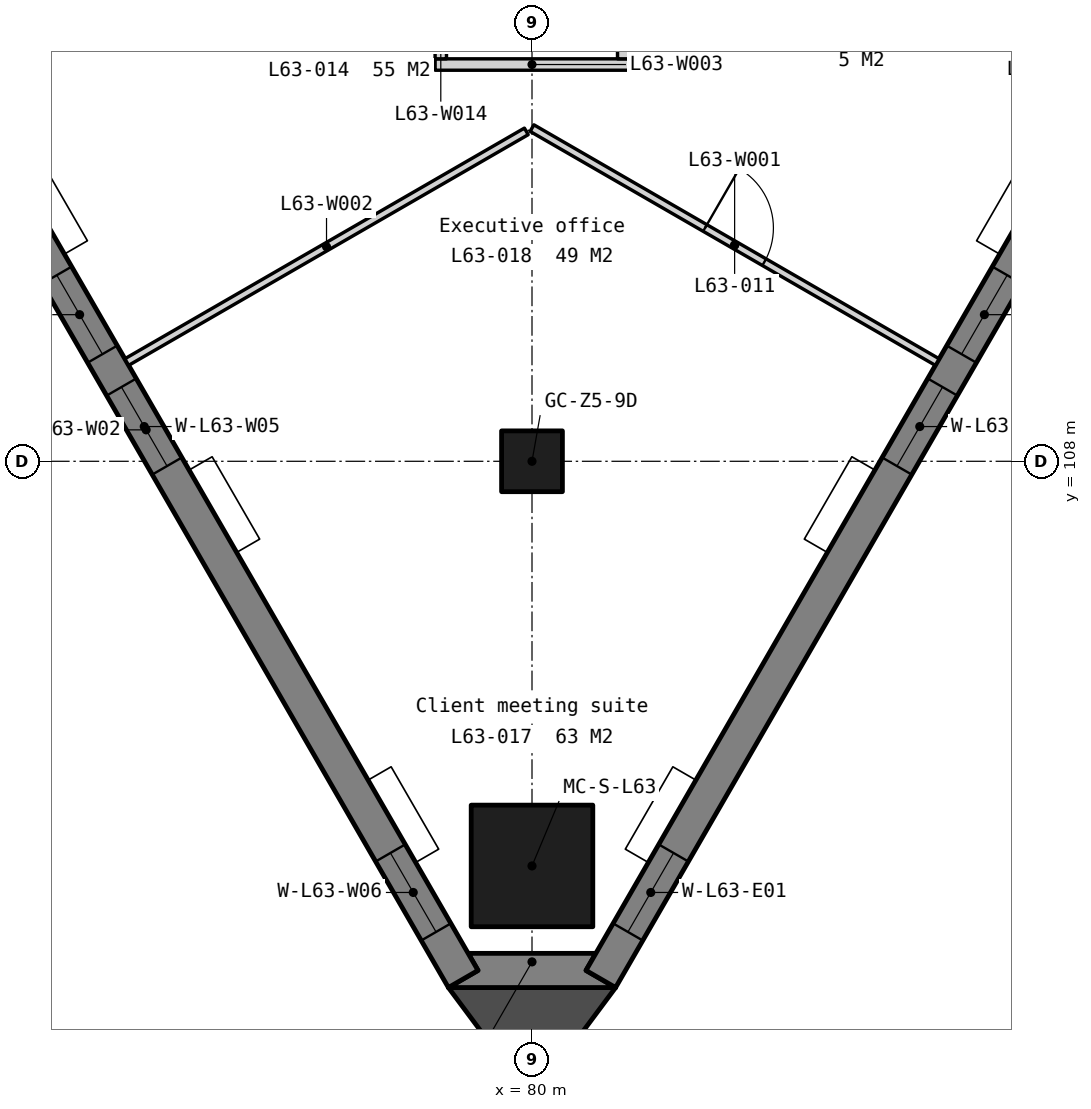
"""IFC4 building model, lengths in metres.
Left out: names, types, materials, properties, quantities, classifications, styles, units other than length and angle.
Written with IfcOpenShell. Run it as: python <this file> out.ifc"""

import sys

from ifc_helpers import new_model, si_unit, direction, frame, frame_2d, origin, origin_2d, place, context, subcontext, project, spatial, polyline, rectangle, outline, extrude, element, fill, save


model = new_model("IFC4")
c1 = context("Model", 3, precision=1e-05, world=origin(), true_north=direction((0.0, 1.0)))
c2 = subcontext(c1, "Body", "Model", "MODEL_VIEW")
j1 = project(units=[si_unit("LENGTHUNIT", "METRE"), si_unit("PLANEANGLEUNIT", "RADIAN")], contexts=[c1])
p1 = place(None, origin())
s1 = spatial("IfcSite", under=j1, at=p1, CompositionType="ELEMENT")
p2 = place(p1, origin())
s2 = spatial("IfcBuilding", under=s1, at=p2, CompositionType="ELEMENT")
p3 = place(p2, frame((0.0, 0.0, 258.2)))
s3 = spatial("IfcBuildingStorey", under=s2, at=p3, CompositionType="ELEMENT", Elevation=258.2)
p4 = place(p3, frame((80.0, 108.0, 0.0), z_axis=(0.0, 0.0, 1.0), x_axis=(1.0, 0.0, 0.0)))
e1 = element("IfcColumn", 1, at=p4, inside=s3, PredefinedType="COLUMN", context=c2, shape_type="SweptSolid", body=[
    extrude(rectangle(XDim=0.8, YDim=0.8, at=origin_2d()), origin(), (0.0, 0.0, 1.0), 3.9),
])
p5 = place(p3, frame((80.0, 102.676, 0.0), z_axis=(0.0, 0.0, 1.0), x_axis=(1.0, 0.0, 0.0)))
e2 = element("IfcColumn", 2, at=p5, inside=s3, PredefinedType="COLUMN", context=c2, shape_type="SweptSolid", body=[
    extrude(rectangle(XDim=1.6, YDim=1.6, at=origin_2d()), origin(), (0.0, 0.0, 1.0), 3.9),
])
p6 = place(p3, frame((0.0, 0.0, -0.15)))
e3 = element("IfcWall", 3, at=p6, inside=s3, PredefinedType="SOLIDWALL", context=c2, shape_type="SweptSolid", body=[
    extrude(outline(polyline([(78.9, 101.076), (79.29, 101.301), (79.16, 101.526), (80.84, 101.526), (80.71, 101.301), (81.1, 101.076), (78.9, 101.076)])), origin(), (0.0, 0.0, 1.0), 3.9),
])
p7 = place(p3, frame((70.752, 115.639, -0.15), z_axis=(0.0, 0.0, 1.0), x_axis=(0.500006996263, -0.866021364453, 0.0)))
e4 = element("IfcWall", 4, at=p7, inside=s3, PredefinedType="SOLIDWALL", context=c2, shape_type="SweptSolid", body=[
    extrude(outline(polyline([(16.686, 3.9), (16.686, 0.0), (0.0, 0.0), (0.0, 3.9), (16.686, 3.9)])), frame((0.0, 0.225, 0.0), z_axis=(0.0, -1.0, 0.0), x_axis=(1.0, 0.0, 0.0)), (0.0, 0.0, 1.0), 0.45),
])
p8 = place(p7, frame((5.993, 0.0, 0.95)))
e5 = element("IfcOpeningElement", 5, at=p8, cuts=e4, PredefinedType="OPENING", context=c2, shape_type="SweptSolid", body=[
    extrude(rectangle(XDim=1.2, YDim=2.2, at=frame_2d((0.6, 1.1))), frame((0.0, 0.235, 0.0), z_axis=(0.0, -1.0, 0.0), x_axis=(1.0, 0.0, 0.0)), (0.0, 0.0, 1.0), 0.47),
])
p9 = place(p7, frame((7.693, 0.0, 0.95)))
e6 = element("IfcOpeningElement", 6, at=p9, cuts=e4, PredefinedType="OPENING", context=c2, shape_type="SweptSolid", body=[
    extrude(rectangle(XDim=1.2, YDim=2.2, at=frame_2d((0.6, 1.1))), frame((0.0, 0.235, 0.0), z_axis=(0.0, -1.0, 0.0), x_axis=(1.0, 0.0, 0.0)), (0.0, 0.0, 1.0), 0.47),
])
p10 = place(p7, frame((14.771, 0.0, 0.95)))
e7 = element("IfcOpeningElement", 7, at=p10, cuts=e4, PredefinedType="OPENING", context=c2, shape_type="SweptSolid", body=[
    extrude(rectangle(XDim=1.2, YDim=2.2, at=frame_2d((0.6, 1.1))), frame((0.0, 0.235, 0.0), z_axis=(0.0, -1.0, 0.0), x_axis=(1.0, 0.0, 0.0)), (0.0, 0.0, 1.0), 0.47),
])
p11 = place(p3, frame((80.905, 101.188, -0.15), z_axis=(0.0, 0.0, 1.0), x_axis=(0.500002536638, 0.866023939251, 0.0)))
e8 = element("IfcWall", 8, at=p11, inside=s3, PredefinedType="SOLIDWALL", context=c2, shape_type="SweptSolid", body=[
    extrude(outline(polyline([(36.972, 0.0), (36.972, 3.9), (0.0, 3.9), (0.0, 0.0), (36.972, 0.0)])), frame((0.0, 0.225, 0.0), z_axis=(0.0, -1.0, 0.0), x_axis=(1.0, 0.0, 0.0)), (0.0, 0.0, 1.0), 0.45),
])
p12 = place(p11, frame((0.715, 0.0, 0.95)))
e9 = element("IfcOpeningElement", 9, at=p12, cuts=e8, PredefinedType="OPENING", context=c2, shape_type="SweptSolid", body=[
    extrude(rectangle(XDim=1.2, YDim=2.2, at=frame_2d((0.6, 1.1))), frame((0.0, 0.235, 0.0), z_axis=(0.0, -1.0, 0.0), x_axis=(1.0, 0.0, 0.0)), (0.0, 0.0, 1.0), 0.47),
])
p13 = place(p11, frame((7.793, 0.0, 0.95)))
e10 = element("IfcOpeningElement", 10, at=p13, cuts=e8, PredefinedType="OPENING", context=c2, shape_type="SweptSolid", body=[
    extrude(rectangle(XDim=1.2, YDim=2.2, at=frame_2d((0.6, 1.1))), frame((0.0, 0.235, 0.0), z_axis=(0.0, -1.0, 0.0), x_axis=(1.0, 0.0, 0.0)), (0.0, 0.0, 1.0), 0.47),
])
p14 = place(p11, frame((9.493, 0.0, 0.95)))
e11 = element("IfcOpeningElement", 11, at=p14, cuts=e8, PredefinedType="OPENING", context=c2, shape_type="SweptSolid", body=[
    extrude(rectangle(XDim=1.2, YDim=2.2, at=frame_2d((0.6, 1.1))), frame((0.0, 0.235, 0.0), z_axis=(0.0, -1.0, 0.0), x_axis=(1.0, 0.0, 0.0)), (0.0, 0.0, 1.0), 0.47),
])
p15 = place(p11, frame((17.036, 0.0, 0.95)))
e12 = element("IfcOpeningElement", 12, at=p15, cuts=e8, PredefinedType="OPENING", context=c2, shape_type="SweptSolid", body=[
    extrude(rectangle(XDim=1.2, YDim=2.2, at=frame_2d((0.6, 1.1))), frame((0.0, 0.235, 0.0), z_axis=(0.0, -1.0, 0.0), x_axis=(1.0, 0.0, 0.0)), (0.0, 0.0, 1.0), 0.47),
])
p16 = place(p11, frame((18.736, 0.0, 0.95)))
e13 = element("IfcOpeningElement", 13, at=p16, cuts=e8, PredefinedType="OPENING", context=c2, shape_type="SweptSolid", body=[
    extrude(rectangle(XDim=1.2, YDim=2.2, at=frame_2d((0.6, 1.1))), frame((0.0, 0.235, 0.0), z_axis=(0.0, -1.0, 0.0), x_axis=(1.0, 0.0, 0.0)), (0.0, 0.0, 1.0), 0.47),
])
p17 = place(p11, frame((26.279, 0.0, 0.95)))
e14 = element("IfcOpeningElement", 14, at=p17, cuts=e8, PredefinedType="OPENING", context=c2, shape_type="SweptSolid", body=[
    extrude(rectangle(XDim=1.2, YDim=2.2, at=frame_2d((0.6, 1.1))), frame((0.0, 0.235, 0.0), z_axis=(0.0, -1.0, 0.0), x_axis=(1.0, 0.0, 0.0)), (0.0, 0.0, 1.0), 0.47),
])
p18 = place(p11, frame((27.979, 0.0, 0.95)))
e15 = element("IfcOpeningElement", 15, at=p18, cuts=e8, PredefinedType="OPENING", context=c2, shape_type="SweptSolid", body=[
    extrude(rectangle(XDim=1.2, YDim=2.2, at=frame_2d((0.6, 1.1))), frame((0.0, 0.235, 0.0), z_axis=(0.0, -1.0, 0.0), x_axis=(1.0, 0.0, 0.0)), (0.0, 0.0, 1.0), 0.47),
])
p19 = place(p11, frame((35.058, 0.0, 0.95)))
e16 = element("IfcOpeningElement", 16, at=p19, cuts=e8, PredefinedType="OPENING", context=c2, shape_type="SweptSolid", body=[
    extrude(rectangle(XDim=1.2, YDim=2.2, at=frame_2d((0.6, 1.1))), frame((0.0, 0.235, 0.0), z_axis=(0.0, -1.0, 0.0), x_axis=(1.0, 0.0, 0.0)), (0.0, 0.0, 1.0), 0.47),
])
p20 = place(p3, frame((0.0, 0.0, -0.15)))
e17 = element("IfcWall", 17, at=p20, inside=s3, PredefinedType="SOLIDWALL", context=c2, shape_type="SweptSolid", body=[
    extrude(outline(polyline([(78.9, 101.076), (80.0, 99.599), (81.1, 101.076), (78.9, 101.076)])), origin(), (0.0, 0.0, 1.0), 3.9),
])
p21 = place(p3, frame((80.0, 112.384, 0.0), z_axis=(0.0, 0.0, 1.0), x_axis=(0.866021154418, -0.500007360046, 0.0)))
e18 = element("IfcWall", 18, at=p21, inside=s3, PredefinedType="PARTITIONING", context=c2, shape_type="SweptSolid", body=[
    extrude(rectangle(XDim=6.157, YDim=0.1, at=frame_2d((3.078, 0.0))), origin(), (0.0, 0.0, 1.0), 3.75),
])
p22 = place(p21, frame((2.628, 0.0, 0.0)))
e19 = element("IfcOpeningElement", 19, at=p22, cuts=e18, PredefinedType="OPENING", context=c2, shape_type="SweptSolid", body=[
    extrude(rectangle(XDim=0.9, YDim=2.1, at=frame_2d((0.45, 1.05))), frame((0.0, 0.06, 0.0), z_axis=(0.0, -1.0, 0.0), x_axis=(1.0, 0.0, 0.0)), (0.0, 0.0, 1.0), 0.12),
])
p23 = place(p3, frame((74.668, 109.305, 0.0), z_axis=(0.0, 0.0, 1.0), x_axis=(0.866016800201, 0.500014901547, 0.0)))
e20 = element("IfcWall", 20, at=p23, inside=s3, PredefinedType="PARTITIONING", context=c2, shape_type="SweptSolid", body=[
    extrude(rectangle(XDim=6.07, YDim=0.1, at=frame_2d((3.035, 0.0))), origin(), (0.0, 0.0, 1.0), 3.75),
])
p24 = place(p3, frame((78.725, 113.22, 0.0), z_axis=(0.0, 0.0, 1.0), x_axis=(1.0, 0.0, 0.0)))
e21 = element("IfcWall", 21, at=p24, inside=s3, PredefinedType="PARTITIONING", context=c2, shape_type="SweptSolid", body=[
    extrude(rectangle(XDim=2.55, YDim=0.15, at=frame_2d((1.275, 0.0))), origin(), (0.0, 0.0, 1.0), 3.28),
])
p25 = place(p3, frame((81.2, 113.295, 0.0), z_axis=(0.0, 0.0, 1.0), x_axis=(0.0, 1.0, 0.0)))
e22 = element("IfcWall", 22, at=p25, inside=s3, PredefinedType="PARTITIONING", context=c2, shape_type="SweptSolid", body=[
    extrude(rectangle(XDim=0.655, YDim=0.15, at=frame_2d((0.327, 0.0))), origin(), (0.0, 0.0, 1.0), 3.75),
])
p26 = place(p3, frame((72.357, 113.308, 0.0), z_axis=(0.0, 0.0, 1.0), x_axis=(0.866016048378, 0.500016203689, 0.0)))
e23 = element("IfcWall", 23, at=p26, inside=s3, PredefinedType="PARTITIONING", context=c2, shape_type="SweptSolid", body=[
    extrude(rectangle(XDim=7.314, YDim=0.2, at=frame_2d((3.657, 0.0))), origin(), (0.0, 0.0, 1.0), 3.75),
])
p27 = place(p3, frame((78.8, 113.295, 0.0), z_axis=(0.0, 0.0, 1.0), x_axis=(0.0, 1.0, 0.0)))
e24 = element("IfcWall", 24, at=p27, inside=s3, PredefinedType="PARTITIONING", context=c2, shape_type="SweptSolid", body=[
    extrude(rectangle(XDim=3.732, YDim=0.15, at=frame_2d((1.866, 0.0))), origin(), (0.0, 0.0, 1.0), 3.75),
])
p28 = place(p27, frame((0.966, 0.0, 0.0)))
e25 = element("IfcOpeningElement", 25, at=p28, cuts=e24, PredefinedType="OPENING", context=c2, shape_type="SweptSolid", body=[
    extrude(rectangle(XDim=1.8, YDim=2.1, at=frame_2d((0.9, 1.05))), frame((0.0, 0.085, 0.0), z_axis=(0.0, -1.0, 0.0), x_axis=(1.0, 0.0, 0.0)), (0.0, 0.0, 1.0), 0.17),
])
p29 = place(p8, origin())
e26 = element("IfcWindow", 26, at=p29, inside=s3, PartitioningType="SINGLE_PANEL", PredefinedType="WINDOW", context=c2, shape_type="SweptSolid", body=[
    extrude(rectangle(XDim=1.2, YDim=2.2, at=frame_2d((0.6, 1.1))), frame((0.0, 0.03, 0.0), z_axis=(0.0, -1.0, 0.0), x_axis=(1.0, 0.0, 0.0)), (0.0, 0.0, 1.0), 0.06),
])
fill(e5, e26)
p30 = place(p9, origin())
e27 = element("IfcWindow", 27, at=p30, inside=s3, PartitioningType="SINGLE_PANEL", PredefinedType="WINDOW", context=c2, shape_type="SweptSolid", body=[
    extrude(rectangle(XDim=1.2, YDim=2.2, at=frame_2d((0.6, 1.1))), frame((0.0, 0.03, 0.0), z_axis=(0.0, -1.0, 0.0), x_axis=(1.0, 0.0, 0.0)), (0.0, 0.0, 1.0), 0.06),
])
fill(e6, e27)
p31 = place(p10, origin())
e28 = element("IfcWindow", 28, at=p31, inside=s3, PartitioningType="SINGLE_PANEL", PredefinedType="WINDOW", context=c2, shape_type="SweptSolid", body=[
    extrude(rectangle(XDim=1.2, YDim=2.2, at=frame_2d((0.6, 1.1))), frame((0.0, 0.03, 0.0), z_axis=(0.0, -1.0, 0.0), x_axis=(1.0, 0.0, 0.0)), (0.0, 0.0, 1.0), 0.06),
])
fill(e7, e28)
p32 = place(p12, origin())
e29 = element("IfcWindow", 29, at=p32, inside=s3, PartitioningType="SINGLE_PANEL", PredefinedType="WINDOW", context=c2, shape_type="SweptSolid", body=[
    extrude(rectangle(XDim=1.2, YDim=2.2, at=frame_2d((0.6, 1.1))), frame((0.0, 0.03, 0.0), z_axis=(0.0, -1.0, 0.0), x_axis=(1.0, 0.0, 0.0)), (0.0, 0.0, 1.0), 0.06),
])
fill(e9, e29)
p33 = place(p13, origin())
e30 = element("IfcWindow", 30, at=p33, inside=s3, PartitioningType="SINGLE_PANEL", PredefinedType="WINDOW", context=c2, shape_type="SweptSolid", body=[
    extrude(rectangle(XDim=1.2, YDim=2.2, at=frame_2d((0.6, 1.1))), frame((0.0, 0.03, 0.0), z_axis=(0.0, -1.0, 0.0), x_axis=(1.0, 0.0, 0.0)), (0.0, 0.0, 1.0), 0.06),
])
fill(e10, e30)
p34 = place(p14, origin())
e31 = element("IfcWindow", 31, at=p34, inside=s3, PartitioningType="SINGLE_PANEL", PredefinedType="WINDOW", context=c2, shape_type="SweptSolid", body=[
    extrude(rectangle(XDim=1.2, YDim=2.2, at=frame_2d((0.6, 1.1))), frame((0.0, 0.03, 0.0), z_axis=(0.0, -1.0, 0.0), x_axis=(1.0, 0.0, 0.0)), (0.0, 0.0, 1.0), 0.06),
])
fill(e11, e31)
p35 = place(p22, origin())
e32 = element("IfcDoor", 32, at=p35, inside=s3, OperationType="SINGLE_SWING_LEFT", PredefinedType="DOOR", context=c2, shape_type="SweptSolid", body=[
    extrude(rectangle(XDim=0.9, YDim=2.1, at=frame_2d((0.45, 1.05))), frame((0.0, 0.025, 0.0), z_axis=(0.0, -1.0, 0.0), x_axis=(1.0, 0.0, 0.0)), (0.0, 0.0, 1.0), 0.05),
])
fill(e19, e32)
save(model, sys.argv[1])
